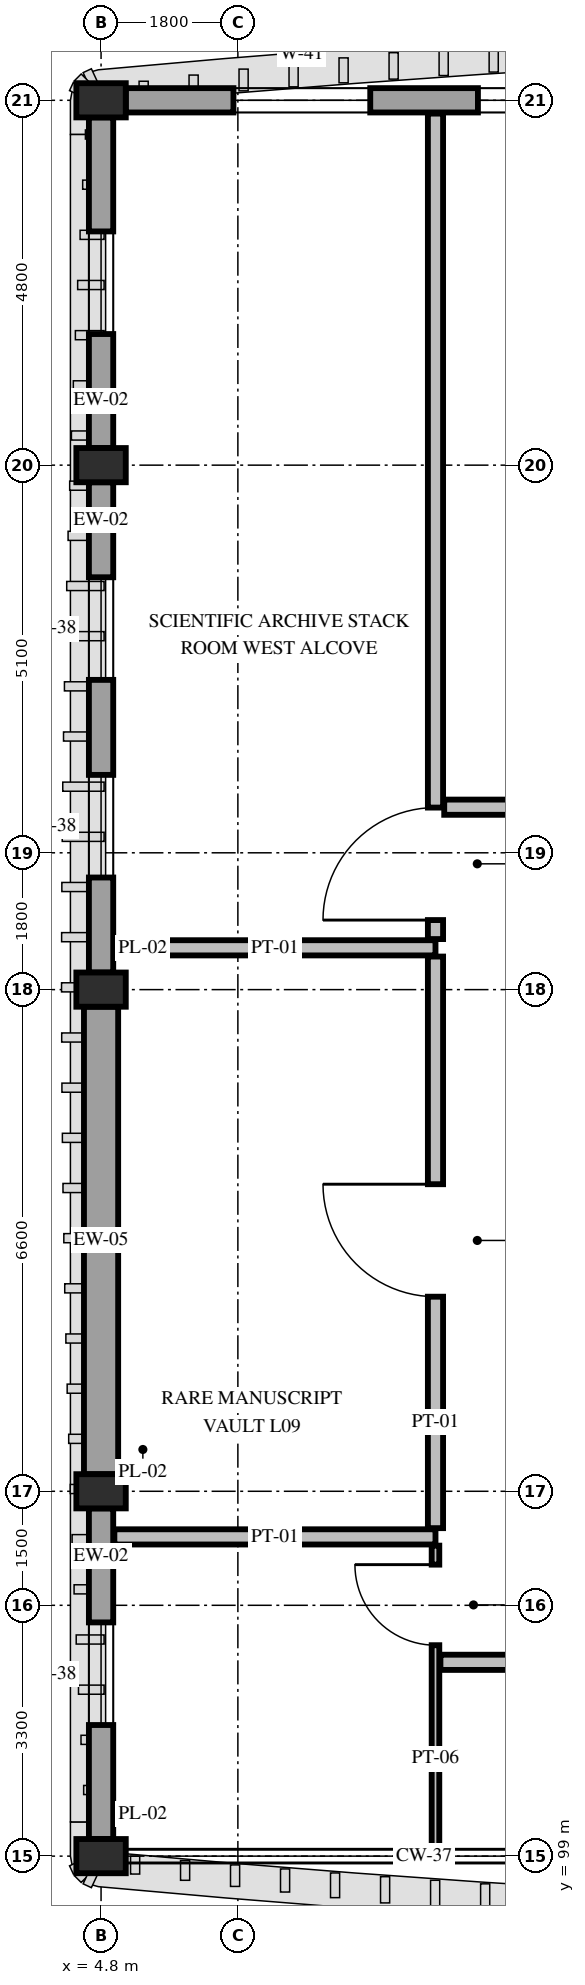
"""IFC4 building model, lengths in metres.
Left out: names, types, materials, properties, quantities, classifications, styles, units other than length and angle.
Written with IfcOpenShell. Run it as: python <this file> out.ifc"""

import sys

from ifc_helpers import new_model, si_unit, direction, frame, frame_2d, origin, origin_2d, place, context, subcontext, project, spatial, rectangle, extrude, element, fill, save


model = new_model("IFC4")
c1 = context("Model", 3, precision=1e-05, world=origin(), true_north=direction((0.0, 1.0)))
c2 = subcontext(c1, "Body", "Model", "MODEL_VIEW")
j1 = project(units=[si_unit("LENGTHUNIT", "METRE"), si_unit("PLANEANGLEUNIT", "RADIAN")], contexts=[c1])
p1 = place(None, origin())
s1 = spatial("IfcSite", under=j1, at=p1, CompositionType="ELEMENT")
p2 = place(p1, origin())
s2 = spatial("IfcBuilding", under=s1, at=p2, CompositionType="ELEMENT")
p3 = place(p2, frame((0.0, 0.0, 42.6)))
s3 = spatial("IfcBuildingStorey", under=s2, at=p3, CompositionType="ELEMENT", Elevation=42.6)
for number, where, z_axis, x_axis in (
    (1, (4.8, 99.0, 0.0), (0.0, 0.0, 1.0), (0.0, 1.0, 0.0)),
    (2, (4.8, 103.8, 0.0), (0.0, 0.0, 1.0), (0.0, 1.0, 0.0)),
    (3, (4.8, 110.4, 0.0), (0.0, 0.0, 1.0), (0.0, 1.0, 0.0)),
    (4, (4.8, 117.3, 0.0), (0.0, 0.0, 1.0), (0.0, 1.0, 0.0)),
    (5, (4.8, 122.1, 0.0), (0.0, 0.0, 1.0), (0.0, 1.0, 0.0)),
):
    element("IfcColumn", number, at=place(p3, frame(where, z_axis=z_axis, x_axis=x_axis)), inside=s3, PredefinedType="PILASTER", context=c2, shape_type="SweptSolid", body=[
        extrude(rectangle(XDim=0.45, YDim=0.65, at=origin_2d()), origin(), (0.0, 0.0, 1.0), 4.2),
    ])
p4 = place(p3, frame((4.8, 99.225, 0.0), z_axis=(0.0, 0.0, 1.0), x_axis=(0.0, 1.0, 0.0)))
e6 = element("IfcWall", 6, at=p4, inside=s3, PredefinedType="STANDARD", context=c2, shape_type="SweptSolid", body=[
    extrude(rectangle(XDim=4.35, YDim=0.32, at=frame_2d((2.175, 0.0))), origin(), (0.0, 0.0, 1.0), 3.35),
])
p5 = place(p4, frame((1.5, 0.0, 0.85)))
e7 = element("IfcOpeningElement", 7, at=p5, cuts=e6, PredefinedType="OPENING", context=c2, shape_type="SweptSolid", body=[
    extrude(rectangle(XDim=1.35, YDim=2.08, at=frame_2d((0.675, 1.04))), frame((0.0, 0.175, 0.0), z_axis=(0.0, -1.0, 0.0), x_axis=(1.0, 0.0, 0.0)), (0.0, 0.0, 1.0), 0.35),
])
p6 = place(p3, frame((4.8, 104.025, 0.0), z_axis=(0.0, 0.0, 1.0), x_axis=(0.0, 1.0, 0.0)))
e8 = element("IfcWall", 8, at=p6, inside=s3, PredefinedType="SOLIDWALL", context=c2, shape_type="SweptSolid", body=[
    extrude(rectangle(XDim=6.15, YDim=0.45, at=frame_2d((3.075, 0.0))), origin(), (0.0, 0.0, 1.0), 3.23),
])
p7 = place(p3, frame((4.8, 110.625, 0.0), z_axis=(0.0, 0.0, 1.0), x_axis=(0.0, 1.0, 0.0)))
e9 = element("IfcWall", 9, at=p7, inside=s3, PredefinedType="STANDARD", context=c2, shape_type="SweptSolid", body=[
    extrude(rectangle(XDim=6.45, YDim=0.32, at=frame_2d((3.225, 0.0))), origin(), (0.0, 0.0, 1.0), 3.23),
])
p8 = place(p7, frame((1.25, 0.0, 0.85)))
e10 = element("IfcOpeningElement", 10, at=p8, cuts=e9, PredefinedType="OPENING", context=c2, shape_type="SweptSolid", body=[
    extrude(rectangle(XDim=1.35, YDim=2.08, at=frame_2d((0.675, 1.04))), frame((0.0, 0.175, 0.0), z_axis=(0.0, -1.0, 0.0), x_axis=(1.0, 0.0, 0.0)), (0.0, 0.0, 1.0), 0.35),
])
p9 = place(p7, frame((3.85, 0.0, 0.85)))
e11 = element("IfcOpeningElement", 11, at=p9, cuts=e9, PredefinedType="OPENING", context=c2, shape_type="SweptSolid", body=[
    extrude(rectangle(XDim=1.35, YDim=2.08, at=frame_2d((0.675, 1.04))), frame((0.0, 0.175, 0.0), z_axis=(0.0, -1.0, 0.0), x_axis=(1.0, 0.0, 0.0)), (0.0, 0.0, 1.0), 0.35),
])
p10 = place(p3, frame((4.8, 117.525, 0.0), z_axis=(0.0, 0.0, 1.0), x_axis=(0.0, 1.0, 0.0)))
e12 = element("IfcWall", 12, at=p10, inside=s3, PredefinedType="STANDARD", context=c2, shape_type="SweptSolid", body=[
    extrude(rectangle(XDim=4.35, YDim=0.32, at=frame_2d((2.175, 0.0))), origin(), (0.0, 0.0, 1.0), 3.35),
])
p11 = place(p10, frame((1.5, 0.0, 0.85)))
e13 = element("IfcOpeningElement", 13, at=p11, cuts=e12, PredefinedType="OPENING", context=c2, shape_type="SweptSolid", body=[
    extrude(rectangle(XDim=1.35, YDim=2.08, at=frame_2d((0.675, 1.04))), frame((0.0, 0.175, 0.0), z_axis=(0.0, -1.0, 0.0), x_axis=(1.0, 0.0, 0.0)), (0.0, 0.0, 1.0), 0.35),
])
p12 = place(p3, frame((5.125, 122.1, 0.0), z_axis=(0.0, 0.0, 1.0), x_axis=(1.0, 0.0, 0.0)))
e14 = element("IfcWall", 14, at=p12, inside=s3, PredefinedType="STANDARD", context=c2, shape_type="SweptSolid", body=[
    extrude(rectangle(XDim=7.85, YDim=0.32, at=frame_2d((3.925, 0.0))), origin(), (0.0, 0.0, 1.0), 3.35),
])
p13 = place(p12, frame((1.417, 0.0, 0.65)))
e15 = element("IfcOpeningElement", 15, at=p13, cuts=e14, PredefinedType="OPENING", context=c2, shape_type="SweptSolid", body=[
    extrude(rectangle(XDim=1.8, YDim=2.24, at=frame_2d((0.9, 1.12))), frame((0.0, 0.175, 0.0), z_axis=(0.0, -1.0, 0.0), x_axis=(1.0, 0.0, 0.0)), (0.0, 0.0, 1.0), 0.35),
])
p14 = place(p12, frame((4.633, 0.0, 0.65)))
e16 = element("IfcOpeningElement", 16, at=p14, cuts=e14, PredefinedType="OPENING", context=c2, shape_type="SweptSolid", body=[
    extrude(rectangle(XDim=1.8, YDim=2.24, at=frame_2d((0.9, 1.12))), frame((0.0, 0.175, 0.0), z_axis=(0.0, -1.0, 0.0), x_axis=(1.0, 0.0, 0.0)), (0.0, 0.0, 1.0), 0.35),
])
p15 = place(p3, frame((4.975, 103.2, 0.0), z_axis=(0.0, 0.0, 1.0), x_axis=(1.0, 0.0, 0.0)))
e17 = element("IfcWall", 17, at=p15, inside=s3, PredefinedType="PARTITIONING", context=c2, shape_type="SweptSolid", body=[
    extrude(rectangle(XDim=4.225, YDim=0.2, at=frame_2d((2.112, 0.0))), origin(), (0.0, 0.0, 1.0), 3.88),
])
p16 = place(p3, frame((4.975, 110.95, 0.0), z_axis=(0.0, 0.0, 1.0), x_axis=(1.0, 0.0, 0.0)))
e18 = element("IfcWall", 18, at=p16, inside=s3, PredefinedType="PARTITIONING", context=c2, shape_type="SweptSolid", body=[
    extrude(rectangle(XDim=4.225, YDim=0.2, at=frame_2d((2.112, 0.0))), origin(), (0.0, 0.0, 1.0), 3.48),
])
p17 = place(p3, frame((9.2, 103.315, 0.0), z_axis=(0.0, 0.0, 1.0), x_axis=(0.0, 1.0, 0.0)))
e19 = element("IfcWall", 19, at=p17, inside=s3, PredefinedType="PARTITIONING", context=c2, shape_type="SweptSolid", body=[
    extrude(rectangle(XDim=7.52, YDim=0.2, at=frame_2d((3.76, 0.0))), origin(), (0.0, 0.0, 1.0), 3.23),
])
p18 = place(p17, frame((3.045, 0.0, 0.0)))
e20 = element("IfcOpeningElement", 20, at=p18, cuts=e19, PredefinedType="OPENING", context=c2, shape_type="SweptSolid", body=[
    extrude(rectangle(XDim=1.48, YDim=2.3, at=frame_2d((0.74, 1.15))), frame((0.0, 0.115, 0.0), z_axis=(0.0, -1.0, 0.0), x_axis=(1.0, 0.0, 0.0)), (0.0, 0.0, 1.0), 0.23),
])
p19 = place(p3, frame((9.2, 111.065, 0.0), z_axis=(0.0, 0.0, 1.0), x_axis=(0.0, 1.0, 0.0)))
e21 = element("IfcWall", 21, at=p19, inside=s3, PredefinedType="PARTITIONING", context=c2, shape_type="SweptSolid", body=[
    extrude(rectangle(XDim=10.86, YDim=0.2, at=frame_2d((5.43, 0.0))), origin(), (0.0, 0.0, 1.0), 3.33),
])
p20 = place(p19, frame((0.25, 0.0, 0.0)))
e22 = element("IfcOpeningElement", 22, at=p20, cuts=e21, PredefinedType="OPENING", context=c2, shape_type="SweptSolid", body=[
    extrude(rectangle(XDim=1.48, YDim=2.3, at=frame_2d((0.74, 1.15))), frame((0.0, 0.115, 0.0), z_axis=(0.0, -1.0, 0.0), x_axis=(1.0, 0.0, 0.0)), (0.0, 0.0, 1.0), 0.23),
])
p21 = place(p3, frame((9.315, 112.8, 0.0), z_axis=(0.0, 0.0, 1.0), x_axis=(1.0, 0.0, 0.0)))
e23 = element("IfcWall", 23, at=p21, inside=s3, PredefinedType="PARTITIONING", context=c2, shape_type="SweptSolid", body=[
    extrude(rectangle(XDim=8.885, YDim=0.2, at=frame_2d((4.442, 0.0))), origin(), (0.0, 0.0, 1.0), 3.53),
])
p22 = place(p21, frame((4.695, 0.0, 0.0)))
e24 = element("IfcOpeningElement", 24, at=p22, cuts=e23, PredefinedType="OPENING", context=c2, shape_type="SweptSolid", body=[
    extrude(rectangle(XDim=1.48, YDim=2.3, at=frame_2d((0.74, 1.15))), frame((0.0, 0.115, 0.0), z_axis=(0.0, -1.0, 0.0), x_axis=(1.0, 0.0, 0.0)), (0.0, 0.0, 1.0), 0.23),
])
p23 = place(p3, frame((9.2, 99.04, 0.0), z_axis=(0.0, 0.0, 1.0), x_axis=(0.0, 1.0, 0.0)))
e25 = element("IfcWall", 25, at=p23, inside=s3, PredefinedType="PARTITIONING", context=c2, shape_type="SweptSolid", body=[
    extrude(rectangle(XDim=4.045, YDim=0.1, at=frame_2d((2.022, 0.0))), origin(), (0.0, 0.0, 1.0), 3.88),
])
p24 = place(p23, frame((2.735, 0.0, 0.0)))
e26 = element("IfcOpeningElement", 26, at=p24, cuts=e25, PredefinedType="OPENING", context=c2, shape_type="SweptSolid", body=[
    extrude(rectangle(XDim=1.06, YDim=2.2, at=frame_2d((0.53, 1.1))), frame((0.0, 0.065, 0.0), z_axis=(0.0, -1.0, 0.0), x_axis=(1.0, 0.0, 0.0)), (0.0, 0.0, 1.0), 0.13),
])
p25 = place(p3, frame((9.265, 101.55, 0.0), z_axis=(0.0, 0.0, 1.0), x_axis=(1.0, 0.0, 0.0)))
e27 = element("IfcWall", 27, at=p25, inside=s3, PredefinedType="PARTITIONING", context=c2, shape_type="SweptSolid", body=[
    extrude(rectangle(XDim=13.535, YDim=0.2, at=frame_2d((6.768, 0.0))), origin(), (0.0, 0.0, 1.0), 3.88),
])
p26 = place(p25, frame((5.995, 0.0, 0.0)))
e28 = element("IfcOpeningElement", 28, at=p26, cuts=e27, PredefinedType="OPENING", context=c2, shape_type="SweptSolid", body=[
    extrude(rectangle(XDim=1.48, YDim=2.3, at=frame_2d((0.74, 1.15))), frame((0.0, 0.115, 0.0), z_axis=(0.0, -1.0, 0.0), x_axis=(1.0, 0.0, 0.0)), (0.0, 0.0, 1.0), 0.23),
])
p27 = place(p5, origin())
e29 = element("IfcWindow", 29, at=p27, inside=s3, PartitioningType="SINGLE_PANEL", PredefinedType="WINDOW", context=c2, shape_type="SweptSolid", body=[
    extrude(rectangle(XDim=1.35, YDim=2.08, at=frame_2d((0.675, 1.04))), frame((0.0, 0.03, 0.0), z_axis=(0.0, -1.0, 0.0), x_axis=(1.0, 0.0, 0.0)), (0.0, 0.0, 1.0), 0.06),
])
fill(e7, e29)
p28 = place(p8, origin())
e30 = element("IfcWindow", 30, at=p28, inside=s3, PartitioningType="SINGLE_PANEL", PredefinedType="WINDOW", context=c2, shape_type="SweptSolid", body=[
    extrude(rectangle(XDim=1.35, YDim=2.08, at=frame_2d((0.675, 1.04))), frame((0.0, 0.03, 0.0), z_axis=(0.0, -1.0, 0.0), x_axis=(1.0, 0.0, 0.0)), (0.0, 0.0, 1.0), 0.06),
])
fill(e10, e30)
p29 = place(p9, origin())
e31 = element("IfcWindow", 31, at=p29, inside=s3, PartitioningType="SINGLE_PANEL", PredefinedType="WINDOW", context=c2, shape_type="SweptSolid", body=[
    extrude(rectangle(XDim=1.35, YDim=2.08, at=frame_2d((0.675, 1.04))), frame((0.0, 0.03, 0.0), z_axis=(0.0, -1.0, 0.0), x_axis=(1.0, 0.0, 0.0)), (0.0, 0.0, 1.0), 0.06),
])
fill(e11, e31)
p30 = place(p11, origin())
e32 = element("IfcWindow", 32, at=p30, inside=s3, PartitioningType="SINGLE_PANEL", PredefinedType="WINDOW", context=c2, shape_type="SweptSolid", body=[
    extrude(rectangle(XDim=1.35, YDim=2.08, at=frame_2d((0.675, 1.04))), frame((0.0, 0.03, 0.0), z_axis=(0.0, -1.0, 0.0), x_axis=(1.0, 0.0, 0.0)), (0.0, 0.0, 1.0), 0.06),
])
fill(e13, e32)
p31 = place(p13, origin())
e33 = element("IfcWindow", 33, at=p31, inside=s3, PartitioningType="DOUBLE_PANEL_VERTICAL", PredefinedType="WINDOW", context=c2, shape_type="SweptSolid", body=[
    extrude(rectangle(XDim=1.8, YDim=2.24, at=frame_2d((0.9, 1.12))), frame((0.0, 0.03, 0.0), z_axis=(0.0, -1.0, 0.0), x_axis=(1.0, 0.0, 0.0)), (0.0, 0.0, 1.0), 0.06),
])
fill(e15, e33)
p32 = place(p14, origin())
e34 = element("IfcWindow", 34, at=p32, inside=s3, PartitioningType="DOUBLE_PANEL_VERTICAL", PredefinedType="WINDOW", context=c2, shape_type="SweptSolid", body=[
    extrude(rectangle(XDim=1.8, YDim=2.24, at=frame_2d((0.9, 1.12))), frame((0.0, 0.03, 0.0), z_axis=(0.0, -1.0, 0.0), x_axis=(1.0, 0.0, 0.0)), (0.0, 0.0, 1.0), 0.06),
])
fill(e16, e34)
p33 = place(p18, origin())
e35 = element("IfcDoor", 35, at=p33, inside=s3, OperationType="SINGLE_SWING_RIGHT", PredefinedType="DOOR", context=c2, shape_type="SweptSolid", body=[
    extrude(rectangle(XDim=1.48, YDim=2.3, at=frame_2d((0.74, 1.15))), frame((0.0, 0.025, 0.0), z_axis=(0.0, -1.0, 0.0), x_axis=(1.0, 0.0, 0.0)), (0.0, 0.0, 1.0), 0.05),
])
fill(e20, e35)
p34 = place(p20, origin())
e36 = element("IfcDoor", 36, at=p34, inside=s3, OperationType="SINGLE_SWING_LEFT", PredefinedType="DOOR", context=c2, shape_type="SweptSolid", body=[
    extrude(rectangle(XDim=1.48, YDim=2.3, at=frame_2d((0.74, 1.15))), frame((0.0, 0.025, 0.0), z_axis=(0.0, -1.0, 0.0), x_axis=(1.0, 0.0, 0.0)), (0.0, 0.0, 1.0), 0.05),
])
fill(e22, e36)
p35 = place(p24, origin())
e37 = element("IfcDoor", 37, at=p35, inside=s3, OperationType="SINGLE_SWING_RIGHT", PredefinedType="DOOR", context=c2, shape_type="SweptSolid", body=[
    extrude(rectangle(XDim=1.06, YDim=2.2, at=frame_2d((0.53, 1.1))), frame((0.0, 0.025, 0.0), z_axis=(0.0, -1.0, 0.0), x_axis=(1.0, 0.0, 0.0)), (0.0, 0.0, 1.0), 0.05),
])
fill(e26, e37)
save(model, sys.argv[1])
